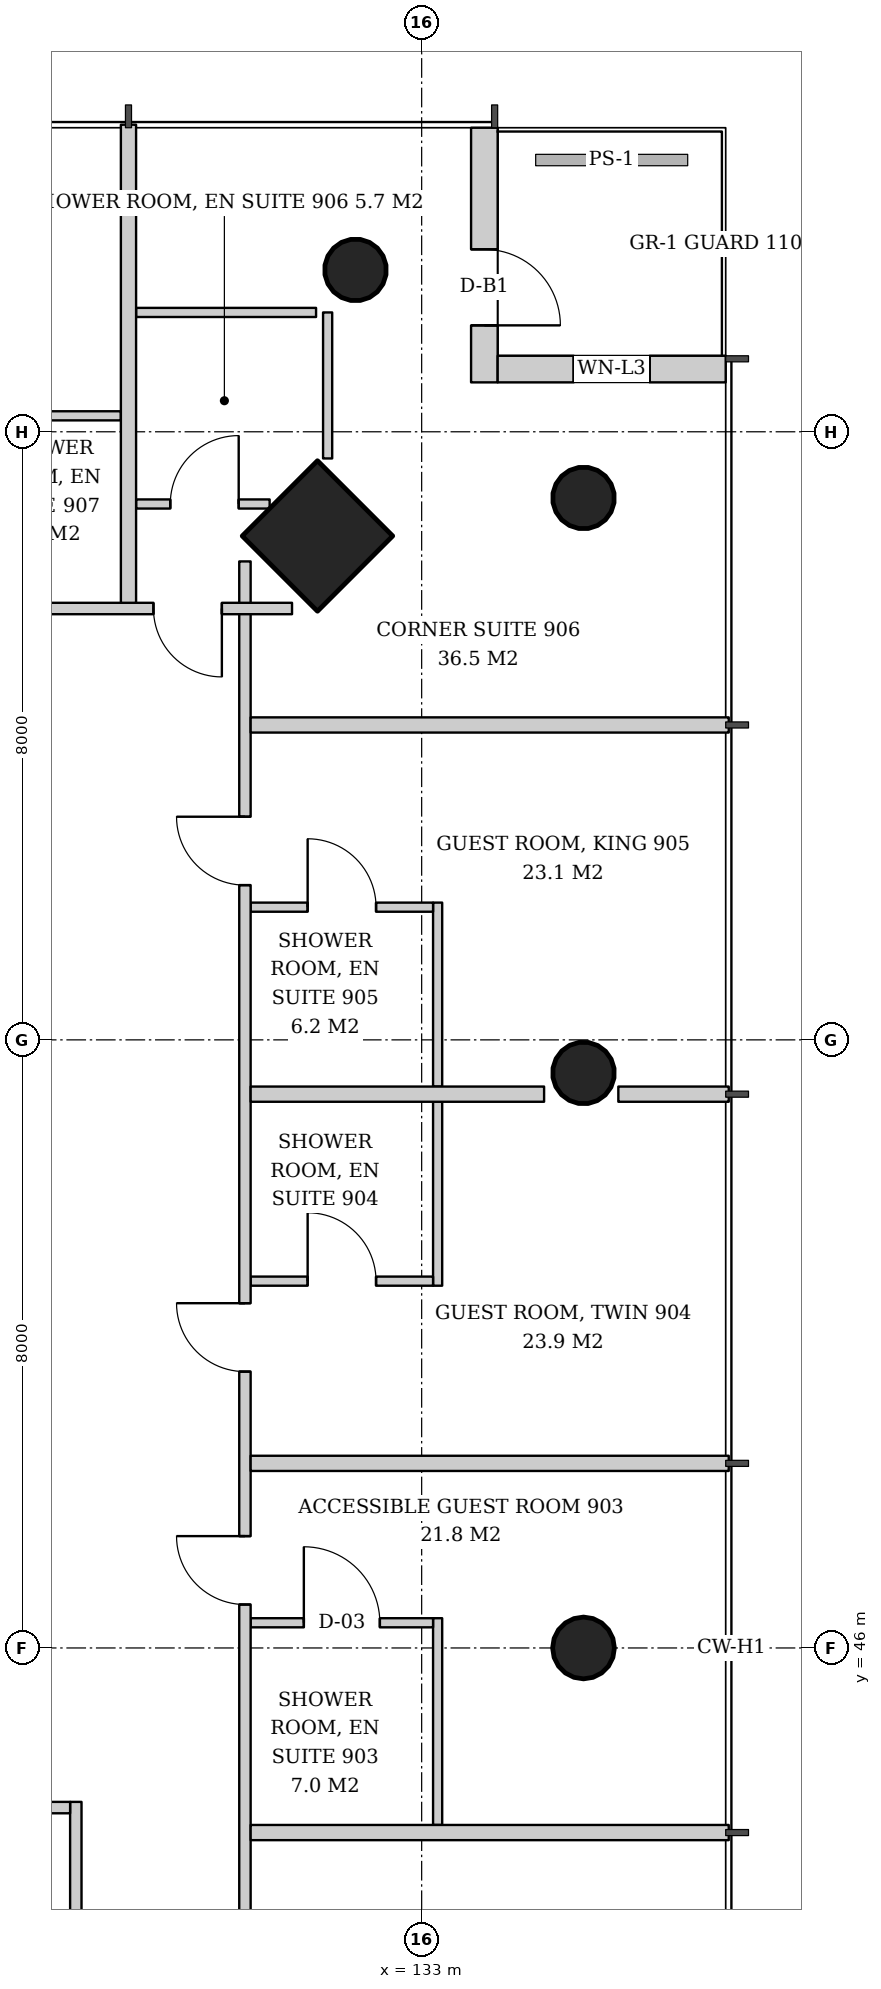
"""IFC4 building model, lengths in metres.
Left out: names, types, materials, properties, quantities, classifications, styles, units other than length and angle.
Written with IfcOpenShell. Run it as: python <this file> out.ifc"""

import sys

from ifc_helpers import new_model, si_unit, direction, frame, frame_2d, origin, origin_2d, place, context, subcontext, project, spatial, rectangle, hollow_circle, extrude, element, fill, save


model = new_model("IFC4")
c1 = context("Model", 3, precision=1e-05, world=origin(), true_north=direction((0.0, 1.0)))
c2 = subcontext(c1, "Body", "Model", "MODEL_VIEW")
j1 = project(units=[si_unit("LENGTHUNIT", "METRE"), si_unit("PLANEANGLEUNIT", "RADIAN")], contexts=[c1])
p1 = place(None, origin())
s1 = spatial("IfcSite", under=j1, at=p1, CompositionType="ELEMENT")
p2 = place(p1, origin())
s2 = spatial("IfcBuilding", under=s1, at=p2, CompositionType="ELEMENT")
p3 = place(p2, frame((0.0, 0.0, 40.0)))
s3 = spatial("IfcBuildingStorey", under=s2, at=p3, CompositionType="ELEMENT", Elevation=40.0)
p4 = place(p3, frame((131.681, 60.681, 0.0), z_axis=(-0.043029647111, -0.043029647111, 0.998146732169), x_axis=(0.707106781187, -0.707106781187, 0.0)))
e1 = element("IfcColumn", 1, at=p4, inside=s3, PredefinedType="COLUMN", context=c2, shape_type="SweptSolid", body=[
    extrude(rectangle(XDim=1.4, YDim=1.4, at=origin_2d()), origin(), (0.0, 0.0, 1.0), 3.807),
])
p5 = place(p3, frame((135.181, 61.181, 0.0), z_axis=(-0.043029647111, -0.043029647111, 0.998146732169), x_axis=(0.707106781187, -0.707106781187, 0.0)))
e2 = element("IfcColumn", 2, at=p5, inside=s3, PredefinedType="COLUMN", context=c2, shape_type="SweptSolid", body=[
    extrude(hollow_circle(Radius=0.406, WallThickness=0.03, at=origin_2d()), origin(), (0.0, 0.0, 1.0), 3.807),
])
p6 = place(p3, frame((135.181, 46.0, 0.0), z_axis=(-0.043069538298, 0.0, 0.999072076915), x_axis=(0.0, -1.0, 0.0)))
e3 = element("IfcColumn", 3, at=p6, inside=s3, PredefinedType="COLUMN", context=c2, shape_type="SweptSolid", body=[
    extrude(hollow_circle(Radius=0.406, WallThickness=0.03, at=origin_2d()), origin(), (0.0, 0.0, 1.0), 3.803),
])
p7 = place(p3, frame((135.181, 53.591, 0.0), z_axis=(-0.043059525333, -0.021561848751, 0.998839808957), x_axis=(0.44774654769, -0.894160516368, 0.0)))
e4 = element("IfcColumn", 4, at=p7, inside=s3, PredefinedType="COLUMN", context=c2, shape_type="SweptSolid", body=[
    extrude(hollow_circle(Radius=0.406, WallThickness=0.03, at=origin_2d()), origin(), (0.0, 0.0, 1.0), 3.804),
])
p8 = place(p3, frame((132.181, 64.181, 0.0), z_axis=(-0.043029647111, -0.043029647111, 0.998146732169), x_axis=(0.707106781187, -0.707106781187, 0.0)))
e5 = element("IfcColumn", 5, at=p8, inside=s3, PredefinedType="COLUMN", context=c2, shape_type="SweptSolid", body=[
    extrude(hollow_circle(Radius=0.406, WallThickness=0.03, at=origin_2d()), origin(), (0.0, 0.0, 1.0), 3.807),
])
p9 = place(p3, frame((133.825, 66.0, 0.0), z_axis=(0.0, 0.0, 1.0), x_axis=(0.0, -1.0, 0.0)))
e6 = element("IfcWall", 6, at=p9, inside=s3, PredefinedType="SOLIDWALL", context=c2, shape_type="SweptSolid", body=[
    extrude(rectangle(XDim=3.35, YDim=0.35, at=frame_2d((1.675, 0.0))), origin(), (0.0, 0.0, 1.0), 3.6),
])
p10 = place(p9, frame((1.6, 0.0, 0.0)))
e7 = element("IfcOpeningElement", 7, at=p10, cuts=e6, PredefinedType="OPENING", context=c2, shape_type="SweptSolid", body=[
    extrude(rectangle(XDim=1.0, YDim=2.4, at=frame_2d((0.5, 1.2))), frame((0.0, 0.185, 0.0), z_axis=(0.0, -1.0, 0.0), x_axis=(1.0, 0.0, 0.0)), (0.0, 0.0, 1.0), 0.37),
])
p11 = place(p3, frame((134.0, 62.825, 0.0), z_axis=(0.0, 0.0, 1.0), x_axis=(1.0, 0.0, 0.0)))
e8 = element("IfcWall", 8, at=p11, inside=s3, PredefinedType="SOLIDWALL", context=c2, shape_type="SweptSolid", body=[
    extrude(rectangle(XDim=3.0, YDim=0.35, at=frame_2d((1.5, 0.0))), origin(), (0.0, 0.0, 1.0), 3.6),
])
p12 = place(p11, frame((1.0, 0.0, 0.9)))
e9 = element("IfcOpeningElement", 9, at=p12, cuts=e8, PredefinedType="OPENING", context=c2, shape_type="SweptSolid", body=[
    extrude(rectangle(XDim=1.0, YDim=2.4, at=frame_2d((0.5, 1.2))), frame((0.0, 0.185, 0.0), z_axis=(0.0, -1.0, 0.0), x_axis=(1.0, 0.0, 0.0)), (0.0, 0.0, 1.0), 0.37),
])
p13 = place(p3, frame((128.45, 36.5, 0.0), z_axis=(0.0, 0.0, 1.0), x_axis=(0.0, 1.0, 0.0)))
e10 = element("IfcWall", 10, at=p13, inside=s3, PredefinedType="PARTITIONING", context=c2, shape_type="SweptSolid", body=[
    extrude(rectangle(XDim=7.475, YDim=0.15, at=frame_2d((3.738, 0.0))), origin(), (0.0, 0.0, 1.0), 2.8),
])
p14 = place(p13, frame((3.238, 0.0, 0.0)))
e11 = element("IfcOpeningElement", 11, at=p14, cuts=e10, PredefinedType="OPENING", context=c2, shape_type="SweptSolid", body=[
    extrude(rectangle(XDim=1.0, YDim=2.1, at=frame_2d((0.5, 1.05))), frame((0.0, 0.085, 0.0), z_axis=(0.0, -1.0, 0.0), x_axis=(1.0, 0.0, 0.0)), (0.0, 0.0, 1.0), 0.17),
])
p15 = place(p3, frame((126.5, 43.9, 0.0), z_axis=(0.0, 0.0, 1.0), x_axis=(1.0, 0.0, 0.0)))
e12 = element("IfcWall", 12, at=p15, inside=s3, PredefinedType="PARTITIONING", context=c2, shape_type="SweptSolid", body=[
    extrude(rectangle(XDim=1.875, YDim=0.15, at=frame_2d((0.938, 0.0))), origin(), (0.0, 0.0, 1.0), 3.6),
])
p16 = place(p3, frame((133.21, 43.671, 0.0), z_axis=(0.0, 0.0, 1.0), x_axis=(0.0, 1.0, 0.0)))
e13 = element("IfcWall", 13, at=p16, inside=s3, PredefinedType="PARTITIONING", context=c2, shape_type="SweptSolid", body=[
    extrude(rectangle(XDim=2.72, YDim=0.12, at=frame_2d((1.36, 0.0))), origin(), (0.0, 0.0, 1.0), 2.847),
])
p17 = place(p3, frame((130.75, 46.332, 0.0), z_axis=(0.0, 0.0, 1.0), x_axis=(1.0, 0.0, 0.0)))
e14 = element("IfcWall", 14, at=p17, inside=s3, PredefinedType="PARTITIONING", context=c2, shape_type="SweptSolid", body=[
    extrude(rectangle(XDim=2.4, YDim=0.12, at=frame_2d((1.2, 0.0))), origin(), (0.0, 0.0, 1.0), 3.6),
])
p18 = place(p17, frame((0.7, 0.0, 0.0)))
e15 = element("IfcOpeningElement", 15, at=p18, cuts=e14, PredefinedType="OPENING", context=c2, shape_type="SweptSolid", body=[
    extrude(rectangle(XDim=1.0, YDim=2.1, at=frame_2d((0.5, 1.05))), frame((0.0, 0.07, 0.0), z_axis=(0.0, -1.0, 0.0), x_axis=(1.0, 0.0, 0.0)), (0.0, 0.0, 1.0), 0.14),
])
p19 = place(p3, frame((133.21, 50.766, 0.0), z_axis=(0.0, 0.0, 1.0), x_axis=(0.0, 1.0, 0.0)))
e16 = element("IfcWall", 16, at=p19, inside=s3, PredefinedType="PARTITIONING", context=c2, shape_type="SweptSolid", body=[
    extrude(rectangle(XDim=2.42, YDim=0.12, at=frame_2d((1.21, 0.0))), origin(), (0.0, 0.0, 1.0), 3.6),
])
p20 = place(p3, frame((130.75, 50.826, 0.0), z_axis=(0.0, 0.0, 1.0), x_axis=(1.0, 0.0, 0.0)))
e17 = element("IfcWall", 17, at=p20, inside=s3, PredefinedType="PARTITIONING", context=c2, shape_type="SweptSolid", body=[
    extrude(rectangle(XDim=2.4, YDim=0.12, at=frame_2d((1.2, 0.0))), origin(), (0.0, 0.0, 1.0), 3.6),
])
p21 = place(p20, frame((0.75, 0.0, 0.0)))
e18 = element("IfcOpeningElement", 18, at=p21, cuts=e17, PredefinedType="OPENING", context=c2, shape_type="SweptSolid", body=[
    extrude(rectangle(XDim=0.9, YDim=2.1, at=frame_2d((0.45, 1.05))), frame((0.0, 0.07, 0.0), z_axis=(0.0, -1.0, 0.0), x_axis=(1.0, 0.0, 0.0)), (0.0, 0.0, 1.0), 0.14),
])
p22 = place(p3, frame((133.21, 53.386, 0.0), z_axis=(0.0, 0.0, 1.0), x_axis=(0.0, 1.0, 0.0)))
e19 = element("IfcWall", 19, at=p22, inside=s3, PredefinedType="PARTITIONING", context=c2, shape_type="SweptSolid", body=[
    extrude(rectangle(XDim=2.42, YDim=0.12, at=frame_2d((1.21, 0.0))), origin(), (0.0, 0.0, 1.0), 3.6),
])
p23 = place(p3, frame((130.75, 55.746, 0.0), z_axis=(0.0, 0.0, 1.0), x_axis=(1.0, 0.0, 0.0)))
e20 = element("IfcWall", 20, at=p23, inside=s3, PredefinedType="PARTITIONING", context=c2, shape_type="SweptSolid", body=[
    extrude(rectangle(XDim=2.4, YDim=0.12, at=frame_2d((1.2, 0.0))), origin(), (0.0, 0.0, 1.0), 3.6),
])
p24 = place(p23, frame((0.75, 0.0, 0.0)))
e21 = element("IfcOpeningElement", 21, at=p24, cuts=e20, PredefinedType="OPENING", context=c2, shape_type="SweptSolid", body=[
    extrude(rectangle(XDim=0.9, YDim=2.1, at=frame_2d((0.45, 1.05))), frame((0.0, 0.07, 0.0), z_axis=(0.0, -1.0, 0.0), x_axis=(1.0, 0.0, 0.0)), (0.0, 0.0, 1.0), 0.14),
])
p25 = place(p3, frame((130.675, 31.706, 0.0), z_axis=(0.0, 0.0, 1.0), x_axis=(0.0, 1.0, 0.0)))
e22 = element("IfcWall", 22, at=p25, inside=s3, PredefinedType="PARTITIONING", context=c2, shape_type="SweptSolid", body=[
    extrude(rectangle(XDim=28.589, YDim=0.15, at=frame_2d((14.294, 0.0))), origin(), (0.0, 0.0, 1.0), 2.8),
])
p26 = place(p25, frame((0.923, 0.0, 0.0)))
e23 = element("IfcOpeningElement", 23, at=p26, cuts=e22, PredefinedType="OPENING", context=c2, shape_type="SweptSolid", body=[
    extrude(rectangle(XDim=0.9, YDim=2.1, at=frame_2d((0.45, 1.05))), frame((0.0, 0.085, 0.0), z_axis=(0.0, -1.0, 0.0), x_axis=(1.0, 0.0, 0.0)), (0.0, 0.0, 1.0), 0.17),
])
p27 = place(p25, frame((4.902, 0.0, 0.0)))
e24 = element("IfcOpeningElement", 24, at=p27, cuts=e22, PredefinedType="OPENING", context=c2, shape_type="SweptSolid", body=[
    extrude(rectangle(XDim=0.9, YDim=2.1, at=frame_2d((0.45, 1.05))), frame((0.0, 0.085, 0.0), z_axis=(0.0, -1.0, 0.0), x_axis=(1.0, 0.0, 0.0)), (0.0, 0.0, 1.0), 0.17),
])
p28 = place(p25, frame((14.866, 0.0, 0.0)))
e25 = element("IfcOpeningElement", 25, at=p28, cuts=e22, PredefinedType="OPENING", context=c2, shape_type="SweptSolid", body=[
    extrude(rectangle(XDim=0.9, YDim=2.1, at=frame_2d((0.45, 1.05))), frame((0.0, 0.085, 0.0), z_axis=(0.0, -1.0, 0.0), x_axis=(1.0, 0.0, 0.0)), (0.0, 0.0, 1.0), 0.17),
])
p29 = place(p25, frame((17.93, 0.0, 0.0)))
e26 = element("IfcOpeningElement", 26, at=p29, cuts=e22, PredefinedType="OPENING", context=c2, shape_type="SweptSolid", body=[
    extrude(rectangle(XDim=0.9, YDim=2.1, at=frame_2d((0.45, 1.05))), frame((0.0, 0.085, 0.0), z_axis=(0.0, -1.0, 0.0), x_axis=(1.0, 0.0, 0.0)), (0.0, 0.0, 1.0), 0.17),
])
p30 = place(p25, frame((24.33, 0.0, 0.0)))
e27 = element("IfcOpeningElement", 27, at=p30, cuts=e22, PredefinedType="OPENING", context=c2, shape_type="SweptSolid", body=[
    extrude(rectangle(XDim=0.9, YDim=2.1, at=frame_2d((0.45, 1.05))), frame((0.0, 0.085, 0.0), z_axis=(0.0, -1.0, 0.0), x_axis=(1.0, 0.0, 0.0)), (0.0, 0.0, 1.0), 0.17),
])
for number, where, z_axis, x_axis in (
    (28, (130.75, 43.572, 0.0), (0.0, 0.0, 1.0), (1.0, 0.0, 0.0)),
    (29, (130.75, 48.428, 0.0), (0.0, 0.0, 1.0), (1.0, 0.0, 0.0)),
):
    element("IfcWall", number, at=place(p3, frame(where, z_axis=z_axis, x_axis=x_axis)), inside=s3, PredefinedType="PARTITIONING", context=c2, shape_type="SweptSolid", body=[
        extrude(rectangle(XDim=6.29, YDim=0.2, at=frame_2d((3.145, 0.0))), origin(), (0.0, 0.0, 1.0), 3.05),
    ])
p31 = place(p3, frame((130.75, 53.286, 0.0), z_axis=(0.0, 0.0, 1.0), x_axis=(1.0, 0.0, 0.0)))
e30 = element("IfcWall", 30, at=p31, inside=s3, PredefinedType="PARTITIONING", context=c2, shape_type="SweptSolid", body=[
    extrude(rectangle(XDim=3.861, YDim=0.2, at=frame_2d((1.93, 0.0))), origin(), (0.0, 0.0, 1.0), 3.6),
])
p32 = place(p3, frame((135.588, 53.286, 0.0), z_axis=(0.0, 0.0, 1.0), x_axis=(1.0, 0.0, 0.0)))
e31 = element("IfcWall", 31, at=p32, inside=s3, PredefinedType="PARTITIONING", context=c2, shape_type="SweptSolid", body=[
    extrude(rectangle(XDim=1.452, YDim=0.2, at=frame_2d((0.726, 0.0))), origin(), (0.0, 0.0, 1.0), 3.6),
])
p33 = place(p3, frame((130.75, 58.143, 0.0), z_axis=(0.0, 0.0, 1.0), x_axis=(1.0, 0.0, 0.0)))
e32 = element("IfcWall", 32, at=p33, inside=s3, PredefinedType="PARTITIONING", context=c2, shape_type="SweptSolid", body=[
    extrude(rectangle(XDim=6.29, YDim=0.2, at=frame_2d((3.145, 0.0))), origin(), (0.0, 0.0, 1.0), 3.05),
])
p34 = place(p3, frame((129.243, 61.05, 0.0), z_axis=(0.0, 0.0, 1.0), x_axis=(1.0, 0.0, 0.0)))
e33 = element("IfcWall", 33, at=p34, inside=s3, PredefinedType="PARTITIONING", context=c2, shape_type="SweptSolid", body=[
    extrude(rectangle(XDim=1.757, YDim=0.12, at=frame_2d((0.878, 0.0))), origin(), (0.0, 0.0, 1.0), 3.6),
])
p35 = place(p34, frame((0.45, 0.0, 0.0)))
e34 = element("IfcOpeningElement", 34, at=p35, cuts=e33, PredefinedType="OPENING", context=c2, shape_type="SweptSolid", body=[
    extrude(rectangle(XDim=0.9, YDim=2.1, at=frame_2d((0.45, 1.05))), frame((0.0, 0.07, 0.0), z_axis=(0.0, -1.0, 0.0), x_axis=(1.0, 0.0, 0.0)), (0.0, 0.0, 1.0), 0.14),
])
p36 = place(p3, frame((129.243, 63.57, 0.0), z_axis=(0.0, 0.0, 1.0), x_axis=(1.0, 0.0, 0.0)))
e35 = element("IfcWall", 35, at=p36, inside=s3, PredefinedType="PARTITIONING", context=c2, shape_type="SweptSolid", body=[
    extrude(rectangle(XDim=2.368, YDim=0.12, at=frame_2d((1.184, 0.0))), origin(), (0.0, 0.0, 1.0), 3.6),
])
p37 = place(p3, frame((131.763, 61.649, 0.0), z_axis=(0.0, 0.0, 1.0), x_axis=(0.0, 1.0, 0.0)))
e36 = element("IfcWall", 36, at=p37, inside=s3, PredefinedType="PARTITIONING", context=c2, shape_type="SweptSolid", body=[
    extrude(rectangle(XDim=1.921, YDim=0.12, at=frame_2d((0.96, 0.0))), origin(), (0.0, 0.0, 1.0), 3.2),
])
p38 = place(p3, frame((129.043, 62.21, 0.0), z_axis=(0.0, 0.0, 1.0), x_axis=(-1.0, 0.0, 0.0)))
e37 = element("IfcWall", 37, at=p38, inside=s3, PredefinedType="PARTITIONING", context=c2, shape_type="SweptSolid", body=[
    extrude(rectangle(XDim=2.42, YDim=0.12, at=frame_2d((1.21, 0.0))), origin(), (0.0, 0.0, 1.0), 3.6),
])
p39 = place(p3, frame((131.294, 59.675, 0.0), z_axis=(0.0, 0.0, 1.0), x_axis=(-1.0, 0.0, 0.0)))
e38 = element("IfcWall", 38, at=p39, inside=s3, PredefinedType="PARTITIONING", context=c2, shape_type="SweptSolid", body=[
    extrude(rectangle(XDim=28.589, YDim=0.15, at=frame_2d((14.294, 0.0))), origin(), (0.0, 0.0, 1.0), 2.8),
])
p40 = place(p39, frame((0.923, 0.0, 0.0)))
e39 = element("IfcOpeningElement", 39, at=p40, cuts=e38, PredefinedType="OPENING", context=c2, shape_type="SweptSolid", body=[
    extrude(rectangle(XDim=0.9, YDim=2.1, at=frame_2d((0.45, 1.05))), frame((0.0, 0.085, 0.0), z_axis=(0.0, -1.0, 0.0), x_axis=(1.0, 0.0, 0.0)), (0.0, 0.0, 1.0), 0.17),
])
p41 = place(p39, frame((4.902, 0.0, 0.0)))
e40 = element("IfcOpeningElement", 40, at=p41, cuts=e38, PredefinedType="OPENING", context=c2, shape_type="SweptSolid", body=[
    extrude(rectangle(XDim=0.9, YDim=2.1, at=frame_2d((0.45, 1.05))), frame((0.0, 0.085, 0.0), z_axis=(0.0, -1.0, 0.0), x_axis=(1.0, 0.0, 0.0)), (0.0, 0.0, 1.0), 0.17),
])
p42 = place(p39, frame((13.073, 0.0, 0.0)))
e41 = element("IfcOpeningElement", 41, at=p42, cuts=e38, PredefinedType="OPENING", context=c2, shape_type="SweptSolid", body=[
    extrude(rectangle(XDim=0.9, YDim=2.1, at=frame_2d((0.45, 1.05))), frame((0.0, 0.085, 0.0), z_axis=(0.0, -1.0, 0.0), x_axis=(1.0, 0.0, 0.0)), (0.0, 0.0, 1.0), 0.17),
])
p43 = place(p39, frame((19.423, 0.0, 0.0)))
e42 = element("IfcOpeningElement", 42, at=p43, cuts=e38, PredefinedType="OPENING", context=c2, shape_type="SweptSolid", body=[
    extrude(rectangle(XDim=1.0, YDim=2.1, at=frame_2d((0.5, 1.05))), frame((0.0, 0.085, 0.0), z_axis=(0.0, -1.0, 0.0), x_axis=(1.0, 0.0, 0.0)), (0.0, 0.0, 1.0), 0.17),
])
p44 = place(p3, frame((129.143, 59.75, 0.0), z_axis=(0.0, 0.0, 1.0), x_axis=(0.0, 1.0, 0.0)))
e43 = element("IfcWall", 43, at=p44, inside=s3, PredefinedType="PARTITIONING", context=c2, shape_type="SweptSolid", body=[
    extrude(rectangle(XDim=6.29, YDim=0.2, at=frame_2d((3.145, 0.0))), origin(), (0.0, 0.0, 1.0), 3.05),
])
p45 = place(p10, origin())
e44 = element("IfcDoor", 44, at=p45, inside=s3, OperationType="SINGLE_SWING_RIGHT", PredefinedType="DOOR", context=c2, shape_type="SweptSolid", body=[
    extrude(rectangle(XDim=1.0, YDim=2.4, at=frame_2d((0.5, 1.2))), frame((0.0, 0.025, 0.0), z_axis=(0.0, -1.0, 0.0), x_axis=(1.0, 0.0, 0.0)), (0.0, 0.0, 1.0), 0.05),
])
fill(e7, e44)
p46 = place(p12, origin())
e45 = element("IfcWindow", 45, at=p46, inside=s3, PartitioningType="SINGLE_PANEL", PredefinedType="WINDOW", context=c2, shape_type="SweptSolid", body=[
    extrude(rectangle(XDim=1.0, YDim=2.4, at=frame_2d((0.5, 1.2))), frame((0.0, 0.03, 0.0), z_axis=(0.0, -1.0, 0.0), x_axis=(1.0, 0.0, 0.0)), (0.0, 0.0, 1.0), 0.06),
])
fill(e9, e45)
p47 = place(p18, origin())
e46 = element("IfcDoor", 46, at=p47, inside=s3, OperationType="SINGLE_SWING_LEFT", PredefinedType="DOOR", context=c2, shape_type="SweptSolid", body=[
    extrude(rectangle(XDim=1.0, YDim=2.1, at=frame_2d((0.5, 1.05))), frame((0.0, 0.025, 0.0), z_axis=(0.0, -1.0, 0.0), x_axis=(1.0, 0.0, 0.0)), (0.0, 0.0, 1.0), 0.05),
])
fill(e15, e46)
p48 = place(p21, origin())
e47 = element("IfcDoor", 47, at=p48, inside=s3, OperationType="SINGLE_SWING_LEFT", PredefinedType="DOOR", context=c2, shape_type="SweptSolid", body=[
    extrude(rectangle(XDim=0.9, YDim=2.1, at=frame_2d((0.45, 1.05))), frame((0.0, 0.025, 0.0), z_axis=(0.0, -1.0, 0.0), x_axis=(1.0, 0.0, 0.0)), (0.0, 0.0, 1.0), 0.05),
])
fill(e18, e47)
p49 = place(p24, origin())
e48 = element("IfcDoor", 48, at=p49, inside=s3, OperationType="SINGLE_SWING_LEFT", PredefinedType="DOOR", context=c2, shape_type="SweptSolid", body=[
    extrude(rectangle(XDim=0.9, YDim=2.1, at=frame_2d((0.45, 1.05))), frame((0.0, 0.025, 0.0), z_axis=(0.0, -1.0, 0.0), x_axis=(1.0, 0.0, 0.0)), (0.0, 0.0, 1.0), 0.05),
])
fill(e21, e48)
p50 = place(p28, origin())
e49 = element("IfcDoor", 49, at=p50, inside=s3, OperationType="SINGLE_SWING_RIGHT", PredefinedType="DOOR", context=c2, shape_type="SweptSolid", body=[
    extrude(rectangle(XDim=0.9, YDim=2.1, at=frame_2d((0.45, 1.05))), frame((0.0, 0.025, 0.0), z_axis=(0.0, -1.0, 0.0), x_axis=(1.0, 0.0, 0.0)), (0.0, 0.0, 1.0), 0.05),
])
fill(e25, e49)
p51 = place(p29, origin())
e50 = element("IfcDoor", 50, at=p51, inside=s3, OperationType="SINGLE_SWING_RIGHT", PredefinedType="DOOR", context=c2, shape_type="SweptSolid", body=[
    extrude(rectangle(XDim=0.9, YDim=2.1, at=frame_2d((0.45, 1.05))), frame((0.0, 0.025, 0.0), z_axis=(0.0, -1.0, 0.0), x_axis=(1.0, 0.0, 0.0)), (0.0, 0.0, 1.0), 0.05),
])
fill(e26, e50)
p52 = place(p30, origin())
e51 = element("IfcDoor", 51, at=p52, inside=s3, OperationType="SINGLE_SWING_RIGHT", PredefinedType="DOOR", context=c2, shape_type="SweptSolid", body=[
    extrude(rectangle(XDim=0.9, YDim=2.1, at=frame_2d((0.45, 1.05))), frame((0.0, 0.025, 0.0), z_axis=(0.0, -1.0, 0.0), x_axis=(1.0, 0.0, 0.0)), (0.0, 0.0, 1.0), 0.05),
])
fill(e27, e51)
p53 = place(p35, origin())
e52 = element("IfcDoor", 52, at=p53, inside=s3, OperationType="SINGLE_SWING_RIGHT", PredefinedType="DOOR", context=c2, shape_type="SweptSolid", body=[
    extrude(rectangle(XDim=0.9, YDim=2.1, at=frame_2d((0.45, 1.05))), frame((0.0, 0.025, 0.0), z_axis=(0.0, -1.0, 0.0), x_axis=(1.0, 0.0, 0.0)), (0.0, 0.0, 1.0), 0.05),
])
fill(e34, e52)
p54 = place(p40, origin())
e53 = element("IfcDoor", 53, at=p54, inside=s3, OperationType="SINGLE_SWING_LEFT", PredefinedType="DOOR", context=c2, shape_type="SweptSolid", body=[
    extrude(rectangle(XDim=0.9, YDim=2.1, at=frame_2d((0.45, 1.05))), frame((0.0, 0.025, 0.0), z_axis=(0.0, -1.0, 0.0), x_axis=(1.0, 0.0, 0.0)), (0.0, 0.0, 1.0), 0.05),
])
fill(e39, e53)
save(model, sys.argv[1])
